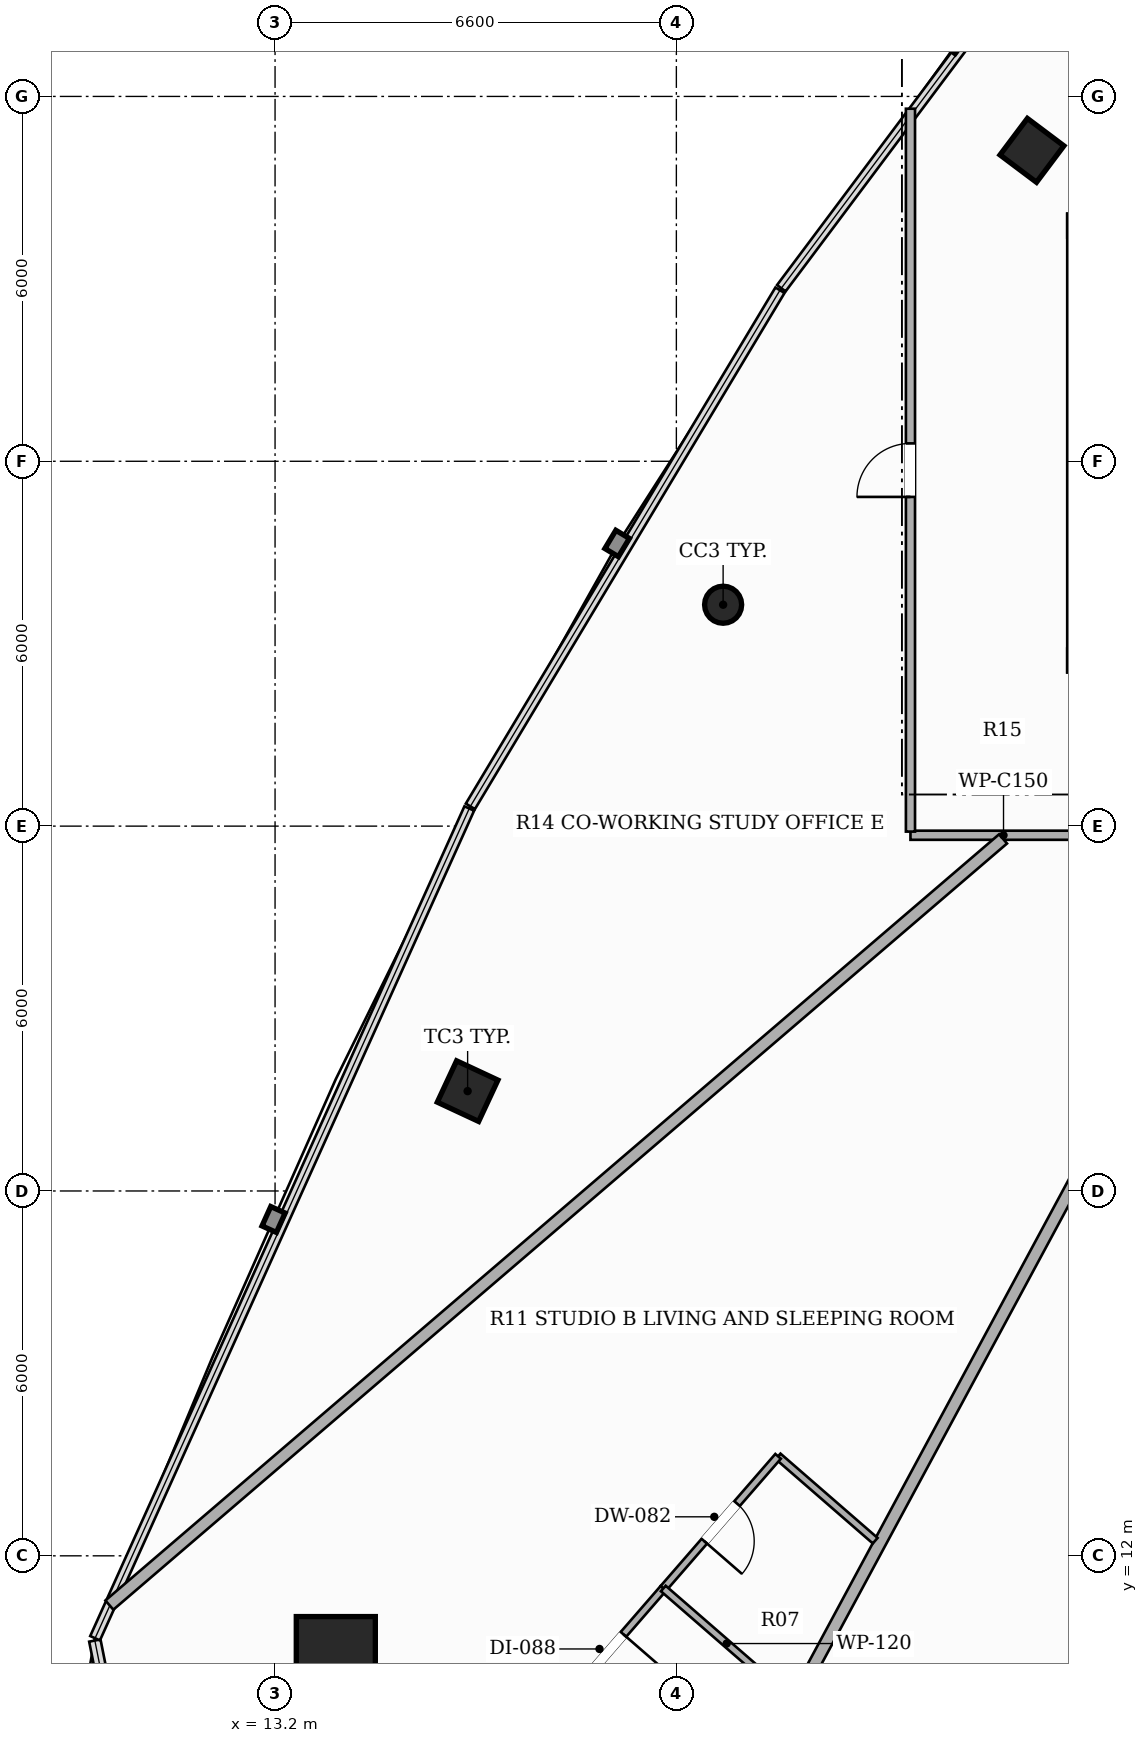
"""IFC4 building model, lengths in metres.
Left out: names, types, materials, properties, quantities, classifications, styles, units other than length and angle.
Written with IfcOpenShell. Run it as: python <this file> out.ifc"""

import sys

from ifc_helpers import new_model, si_unit, direction, frame, frame_2d, origin, origin_2d, place, context, subcontext, project, spatial, rectangle, hollow_rectangle, hollow_circle, extrude, element, fill, save


model = new_model("IFC4")
c1 = context("Model", 3, precision=1e-05, world=origin(), true_north=direction((0.0, 1.0)))
c2 = subcontext(c1, "Body", "Model", "MODEL_VIEW")
j1 = project(units=[si_unit("LENGTHUNIT", "METRE"), si_unit("PLANEANGLEUNIT", "RADIAN")], contexts=[c1])
p1 = place(None, origin())
s1 = spatial("IfcSite", under=j1, at=p1, CompositionType="ELEMENT")
p2 = place(p1, origin())
s2 = spatial("IfcBuilding", under=s1, at=p2, CompositionType="ELEMENT")
p3 = place(p2, frame((0.0, 0.0, 232.7)))
s3 = spatial("IfcBuildingStorey", under=s2, at=p3, CompositionType="ELEMENT", Elevation=232.7)
p4 = place(p3, frame((14.199, 10.351, 0.0), z_axis=(0.0, 0.0, 1.0), x_axis=(1.0, 0.0, 0.0)))
e1 = element("IfcColumn", 1, at=p4, inside=s3, PredefinedType="COLUMN", context=c2, shape_type="SweptSolid", body=[
    extrude(hollow_rectangle(XDim=1.3, YDim=1.3, WallThickness=0.04, at=origin_2d()), origin(), (0.0, 0.0, 1.0), 3.3),
])
p5 = place(p3, frame((25.648, 35.113, 0.0), z_axis=(0.0, 0.0, 1.0), x_axis=(0.600420225326, 0.799684658487, 0.0)))
e2 = element("IfcColumn", 2, at=p5, inside=s3, PredefinedType="COLUMN", context=c2, shape_type="SweptSolid", body=[
    extrude(hollow_rectangle(XDim=0.75, YDim=0.75, WallThickness=0.025, at=origin_2d()), origin(), (0.0, 0.0, 1.0), 3.3),
])
p6 = place(p3, frame((20.569, 27.641, 0.0), z_axis=(0.0, 0.0, 1.0), x_axis=(1.0, 0.0, 0.0)))
e3 = element("IfcColumn", 3, at=p6, inside=s3, PredefinedType="COLUMN", context=c2, shape_type="SweptSolid", body=[
    extrude(hollow_circle(Radius=0.305, WallThickness=0.016, at=origin_2d()), origin(), (0.0, 0.0, 1.0), 3.3),
])
p7 = place(p3, frame((16.367, 19.642, 0.0), z_axis=(0.0, 0.0, 1.0), x_axis=(0.422618261741, 0.906307787037, 0.0)))
e4 = element("IfcColumn", 4, at=p7, inside=s3, PredefinedType="COLUMN", context=c2, shape_type="SweptSolid", body=[
    extrude(hollow_rectangle(XDim=0.75, YDim=0.75, WallThickness=0.025, at=origin_2d()), origin(), (0.0, 0.0, 1.0), 3.3),
])
p8 = place(p3, frame((32.096, 23.85, 0.0), z_axis=(0.0, 0.0, 1.0), x_axis=(-1.0, 0.0, 0.0)))
e5 = element("IfcWall", 5, at=p8, inside=s3, PredefinedType="PARTITIONING", context=c2, shape_type="SweptSolid", body=[
    extrude(rectangle(XDim=8.446, YDim=0.15, at=frame_2d((4.223, 0.0))), origin(), (0.0, 0.0, 1.0), 2.525),
])
p9 = place(p8, frame((4.365, 0.0, 0.0)))
e6 = element("IfcOpeningElement", 6, at=p9, cuts=e5, PredefinedType="OPENING", context=c2, shape_type="SweptSolid", body=[
    extrude(rectangle(XDim=0.92, YDim=2.15, at=frame_2d((0.46, 1.075))), frame((0.0, 0.085, 0.0), z_axis=(0.0, -1.0, 0.0), x_axis=(1.0, 0.0, 0.0)), (0.0, 0.0, 1.0), 0.17),
])
p10 = place(p8, frame((1.045, 0.0, 0.0)))
e7 = element("IfcOpeningElement", 7, at=p10, cuts=e5, PredefinedType="OPENING", context=c2, shape_type="SweptSolid", body=[
    extrude(rectangle(XDim=0.92, YDim=2.15, at=frame_2d((0.46, 1.075))), frame((0.0, 0.085, 0.0), z_axis=(0.0, -1.0, 0.0), x_axis=(1.0, 0.0, 0.0)), (0.0, 0.0, 1.0), 0.17),
])
p11 = place(p3, frame((23.65, 23.91, 0.0), z_axis=(0.0, 0.0, 1.0), x_axis=(0.0, 1.0, 0.0)))
e8 = element("IfcWall", 8, at=p11, inside=s3, PredefinedType="PARTITIONING", context=c2, shape_type="SweptSolid", body=[
    extrude(rectangle(XDim=11.888, YDim=0.15, at=frame_2d((5.944, 0.0))), origin(), (0.0, 0.0, 1.0), 2.452),
])
p12 = place(p11, frame((5.504, 0.0, 0.0)))
e9 = element("IfcOpeningElement", 9, at=p12, cuts=e8, PredefinedType="OPENING", context=c2, shape_type="SweptSolid", body=[
    extrude(rectangle(XDim=0.88, YDim=2.1, at=frame_2d((0.44, 1.05))), frame((0.0, 0.085, 0.0), z_axis=(0.0, -1.0, 0.0), x_axis=(1.0, 0.0, 0.0)), (0.0, 0.0, 1.0), 0.17),
])
p13 = place(p3, frame((29.385, 23.79, 0.0), z_axis=(0.0, 0.0, 1.0), x_axis=(-0.474361203305, -0.880330306646, 0.0)))
e10 = element("IfcWall", 10, at=p13, inside=s3, PredefinedType="PARTITIONING", context=c2, shape_type="SweptSolid", body=[
    extrude(rectangle(XDim=20.44, YDim=0.2, at=frame_2d((10.22, 0.0))), origin(), (0.0, 0.0, 1.0), 2.452),
])
p14 = place(p3, frame((10.475, 11.19, 0.0), z_axis=(0.0, 0.0, 1.0), x_axis=(0.759210311249, 0.650845375871, 0.0)))
e11 = element("IfcWall", 11, at=p14, inside=s3, PredefinedType="PARTITIONING", context=c2, shape_type="SweptSolid", body=[
    extrude(rectangle(XDim=19.36, YDim=0.2, at=frame_2d((9.68, 0.0))), origin(), (0.0, 0.0, 1.0), 2.452),
])
p15 = place(p3, frame((23.07, 12.249, 0.0), z_axis=(0.0, 0.0, 1.0), x_axis=(-0.75504514731, 0.655672803709, 0.0)))
e12 = element("IfcWall", 12, at=p15, inside=s3, PredefinedType="PARTITIONING", context=c2, shape_type="SweptSolid", body=[
    extrude(rectangle(XDim=2.115, YDim=0.12, at=frame_2d((1.058, 0.0))), origin(), (0.0, 0.0, 1.0), 2.733),
])
p16 = place(p3, frame((21.473, 13.636, 0.0), z_axis=(0.0, 0.0, 1.0), x_axis=(-0.655840593364, -0.754899407932, 0.0)))
e13 = element("IfcWall", 13, at=p16, inside=s3, PredefinedType="PARTITIONING", context=c2, shape_type="SweptSolid", body=[
    extrude(rectangle(XDim=2.879, YDim=0.12, at=frame_2d((1.439, 0.0))), origin(), (0.0, 0.0, 1.0), 2.733),
])
p17 = place(p16, frame((1.029, 0.0, 0.0)))
e14 = element("IfcOpeningElement", 14, at=p17, cuts=e13, PredefinedType="OPENING", context=c2, shape_type="SweptSolid", body=[
    extrude(rectangle(XDim=0.82, YDim=2.1, at=frame_2d((0.41, 1.05))), frame((0.0, 0.07, 0.0), z_axis=(0.0, -1.0, 0.0), x_axis=(1.0, 0.0, 0.0)), (0.0, 0.0, 1.0), 0.14),
])
p18 = place(p3, frame((19.585, 11.463, 0.0), z_axis=(0.0, 0.0, 1.0), x_axis=(-0.655689200825, -0.755030907924, 0.0)))
e15 = element("IfcWall", 15, at=p18, inside=s3, PredefinedType="PARTITIONING", context=c2, shape_type="SweptSolid", body=[
    extrude(rectangle(XDim=2.878, YDim=0.12, at=frame_2d((1.439, 0.0))), origin(), (0.0, 0.0, 1.0), 2.452),
])
p19 = place(p18, frame((0.999, 0.0, 0.0)))
e16 = element("IfcOpeningElement", 16, at=p19, cuts=e15, PredefinedType="OPENING", context=c2, shape_type="SweptSolid", body=[
    extrude(rectangle(XDim=0.88, YDim=2.1, at=frame_2d((0.44, 1.05))), frame((0.0, 0.07, 0.0), z_axis=(0.0, -1.0, 0.0), x_axis=(1.0, 0.0, 0.0)), (0.0, 0.0, 1.0), 0.14),
])
p20 = place(p3, frame((21.67, 9.652, 0.0), z_axis=(0.0, 0.0, 1.0), x_axis=(-0.755003171317, 0.655721138367, 0.0)))
e17 = element("IfcWall", 17, at=p20, inside=s3, PredefinedType="PARTITIONING", context=c2, shape_type="SweptSolid", body=[
    extrude(rectangle(XDim=2.761, YDim=0.12, at=frame_2d((1.381, 0.0))), origin(), (0.0, 0.0, 1.0), 2.733),
])
p21 = place(p17, origin())
e18 = element("IfcDoor", 18, at=p21, inside=s3, OperationType="SINGLE_SWING_RIGHT", PredefinedType="DOOR", context=c2, shape_type="SweptSolid", body=[
    extrude(rectangle(XDim=0.82, YDim=2.1, at=frame_2d((0.41, 1.05))), frame((0.0, 0.025, 0.0), z_axis=(0.0, -1.0, 0.0), x_axis=(1.0, 0.0, 0.0)), (0.0, 0.0, 1.0), 0.05),
])
fill(e14, e18)
p22 = place(p19, origin())
e19 = element("IfcDoor", 19, at=p22, inside=s3, OperationType="SINGLE_SWING_LEFT", PredefinedType="DOOR", context=c2, shape_type="SweptSolid", body=[
    extrude(rectangle(XDim=0.88, YDim=2.1, at=frame_2d((0.44, 1.05))), frame((0.0, 0.025, 0.0), z_axis=(0.0, -1.0, 0.0), x_axis=(1.0, 0.0, 0.0)), (0.0, 0.0, 1.0), 0.05),
])
fill(e16, e19)
p23 = place(p12, origin())
e20 = element("IfcDoor", 20, at=p23, inside=s3, OperationType="SINGLE_SWING_LEFT", PredefinedType="DOOR", context=c2, shape_type="SweptSolid", body=[
    extrude(rectangle(XDim=0.88, YDim=2.1, at=frame_2d((0.44, 1.05))), frame((0.0, 0.025, 0.0), z_axis=(0.0, -1.0, 0.0), x_axis=(1.0, 0.0, 0.0)), (0.0, 0.0, 1.0), 0.05),
])
fill(e9, e20)
save(model, sys.argv[1])
